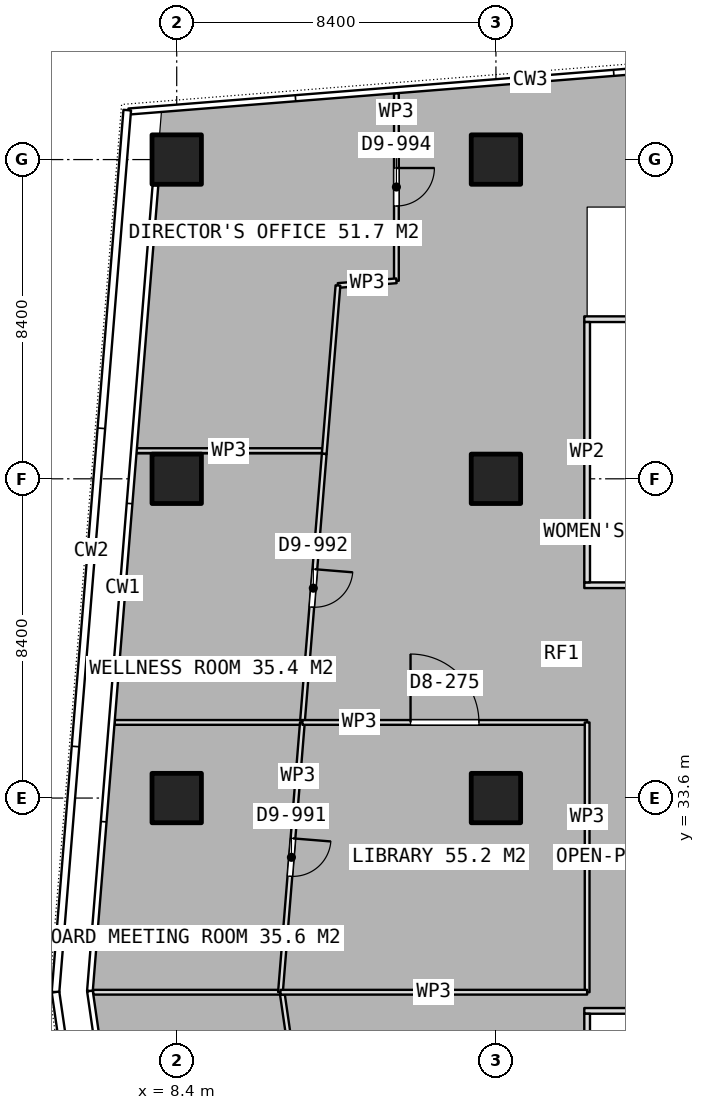
"""IFC4 building model, lengths in metres.
Left out: names, types, materials, properties, quantities, classifications, styles, units other than length and angle.
Written with IfcOpenShell. Run it as: python <this file> out.ifc"""

import sys

from ifc_helpers import new_model, si_unit, direction, frame, frame_2d, origin, origin_2d, place, context, subcontext, project, spatial, rectangle, extrude, element, fill, save


model = new_model("IFC4")
c1 = context("Model", 3, precision=1e-05, world=origin(), true_north=direction((0.0, 1.0)))
c2 = subcontext(c1, "Body", "Model", "MODEL_VIEW")
j1 = project(units=[si_unit("LENGTHUNIT", "METRE"), si_unit("PLANEANGLEUNIT", "RADIAN")], contexts=[c1])
p1 = place(None, origin())
s1 = spatial("IfcSite", under=j1, at=p1, CompositionType="ELEMENT")
p2 = place(p1, origin())
s2 = spatial("IfcBuilding", under=s1, at=p2, CompositionType="ELEMENT")
p3 = place(p2, frame((0.0, 0.0, 265.1)))
s3 = spatial("IfcBuildingStorey", under=s2, at=p3, CompositionType="ELEMENT", Elevation=265.1)
for number, where, z_axis, x_axis in (
    (1, (8.4, 33.6, 0.0), (0.0, 0.0, 1.0), (1.0, 0.0, 0.0)),
    (2, (8.4, 42.0, 0.0), (0.0, 0.0, 1.0), (1.0, 0.0, 0.0)),
    (3, (8.4, 50.4, 0.0), (0.0, 0.0, 1.0), (1.0, 0.0, 0.0)),
    (4, (16.8, 33.6, 0.0), (0.0, 0.0, 1.0), (1.0, 0.0, 0.0)),
    (5, (16.8, 42.0, 0.0), (0.0, 0.0, 1.0), (1.0, 0.0, 0.0)),
    (6, (16.8, 50.4, 0.0), (0.0, 0.0, 1.0), (1.0, 0.0, 0.0)),
):
    element("IfcColumn", number, at=place(p3, frame(where, z_axis=z_axis, x_axis=x_axis)), inside=s3, PredefinedType="COLUMN", context=c2, shape_type="SweptSolid", body=[
        extrude(rectangle(XDim=1.3, YDim=1.3, at=origin_2d()), origin(), (0.0, 0.0, 1.0), 3.75),
    ])
for number, where, z_axis, x_axis in (
    (7, (19.125, 39.2, 0.0), (0.0, 0.0, 1.0), (1.0, 0.0, 0.0)),
    (8, (19.125, 46.2, 0.0), (0.0, 0.0, 1.0), (1.0, 0.0, 0.0)),
):
    element("IfcWall", number, at=place(p3, frame(where, z_axis=z_axis, x_axis=x_axis)), inside=s3, PredefinedType="PARTITIONING", context=c2, shape_type="SweptSolid", body=[
        extrude(rectangle(XDim=3.35, YDim=0.15, at=frame_2d((1.675, 0.0))), origin(), (0.0, 0.0, 1.0), 3.5),
    ])
p4 = place(p3, frame((19.2, 39.275, 0.0), z_axis=(0.0, 0.0, 1.0), x_axis=(0.0, 1.0, 0.0)))
e9 = element("IfcWall", 9, at=p4, inside=s3, PredefinedType="PARTITIONING", context=c2, shape_type="SweptSolid", body=[
    extrude(rectangle(XDim=6.85, YDim=0.15, at=frame_2d((3.425, 0.0))), origin(), (0.0, 0.0, 1.0), 3.5),
])
p5 = place(p3, frame((19.125, 28.0, 0.0), z_axis=(0.0, 0.0, 1.0), x_axis=(1.0, 0.0, 0.0)))
e10 = element("IfcWall", 10, at=p5, inside=s3, PredefinedType="PARTITIONING", context=c2, shape_type="SweptSolid", body=[
    extrude(rectangle(XDim=3.35, YDim=0.15, at=frame_2d((1.675, 0.0))), origin(), (0.0, 0.0, 1.0), 3.5),
])
p6 = place(p3, frame((19.2, 21.075, 0.0), z_axis=(0.0, 0.0, 1.0), x_axis=(0.0, 1.0, 0.0)))
e11 = element("IfcWall", 11, at=p6, inside=s3, PredefinedType="PARTITIONING", context=c2, shape_type="SweptSolid", body=[
    extrude(rectangle(XDim=6.85, YDim=0.15, at=frame_2d((3.425, 0.0))), origin(), (0.0, 0.0, 1.0), 3.5),
])
p7 = place(p3, frame((12.226, 42.742, 0.0), z_axis=(0.0, 0.0, 1.0), x_axis=(-1.0, 0.0, 0.0)))
e12 = element("IfcWall", 12, at=p7, inside=s3, PredefinedType="PARTITIONING", context=c2, shape_type="SweptSolid", body=[
    extrude(rectangle(XDim=4.903, YDim=0.125, at=frame_2d((2.452, 0.0))), origin(), (0.0, 0.0, 1.0), 3.5),
])
p8 = place(p3, frame((14.181, 52.146, 0.0), z_axis=(0.0, 0.0, 1.0), x_axis=(0.0, -1.0, 0.0)))
e13 = element("IfcWall", 13, at=p8, inside=s3, PredefinedType="PARTITIONING", context=c2, shape_type="SweptSolid", body=[
    extrude(rectangle(XDim=4.936, YDim=0.125, at=frame_2d((2.468, 0.0))), origin(), (0.0, 0.0, 1.0), 3.5),
])
p9 = place(p8, frame((1.968, 0.0, 0.0)))
e14 = element("IfcOpeningElement", 14, at=p9, cuts=e13, PredefinedType="OPENING", context=c2, shape_type="SweptSolid", body=[
    extrude(rectangle(XDim=1.0, YDim=2.1, at=frame_2d((0.5, 1.05))), frame((0.0, 0.073, 0.0), z_axis=(0.0, -1.0, 0.0), x_axis=(1.0, 0.0, 0.0)), (0.0, 0.0, 1.0), 0.145),
])
p10 = place(p3, frame((14.181, 47.21, 0.0), z_axis=(0.0, 0.0, 1.0), x_axis=(-0.9968142721, -0.079757801737, 0.0)))
e15 = element("IfcWall", 15, at=p10, inside=s3, PredefinedType="PARTITIONING", context=c2, shape_type="SweptSolid", body=[
    extrude(rectangle(XDim=1.543, YDim=0.125, at=frame_2d((0.771, 0.0))), origin(), (0.0, 0.0, 1.0), 3.5),
])
p11 = place(p3, frame((12.643, 47.087, 0.0), z_axis=(0.0, 0.0, 1.0), x_axis=(-0.081240627764, -0.996694517092, 0.0)))
e16 = element("IfcWall", 16, at=p11, inside=s3, PredefinedType="PARTITIONING", context=c2, shape_type="SweptSolid", body=[
    extrude(rectangle(XDim=4.445, YDim=0.125, at=frame_2d((2.222, 0.0))), origin(), (0.0, 0.0, 1.0), 3.5),
])
p12 = place(p3, frame((12.282, 42.656, 0.0), z_axis=(0.0, 0.0, 1.0), x_axis=(-0.08110159124, -0.996705840205, 0.0)))
e17 = element("IfcWall", 17, at=p12, inside=s3, PredefinedType="PARTITIONING", context=c2, shape_type="SweptSolid", body=[
    extrude(rectangle(XDim=7.089, YDim=0.125, at=frame_2d((3.545, 0.0))), origin(), (0.0, 0.0, 1.0), 3.5),
])
p13 = place(p12, frame((3.045, 0.0, 0.0)))
e18 = element("IfcOpeningElement", 18, at=p13, cuts=e17, PredefinedType="OPENING", context=c2, shape_type="SweptSolid", body=[
    extrude(rectangle(XDim=1.0, YDim=2.1, at=frame_2d((0.5, 1.05))), frame((0.0, 0.073, 0.0), z_axis=(0.0, -1.0, 0.0), x_axis=(1.0, 0.0, 0.0)), (0.0, 0.0, 1.0), 0.145),
])
p14 = place(p3, frame((11.707, 35.59, 0.0), z_axis=(0.0, 0.0, 1.0), x_axis=(-1.0, 0.0, 0.0)))
e19 = element("IfcWall", 19, at=p14, inside=s3, PredefinedType="PARTITIONING", context=c2, shape_type="SweptSolid", body=[
    extrude(rectangle(XDim=4.936, YDim=0.125, at=frame_2d((2.468, 0.0))), origin(), (0.0, 0.0, 1.0), 3.5),
])
p15 = place(p3, frame((6.201, 28.491, 0.0), z_axis=(0.0, 0.0, 1.0), x_axis=(1.0, 0.0, 0.0)))
e20 = element("IfcWall", 20, at=p15, inside=s3, PredefinedType="PARTITIONING", context=c2, shape_type="SweptSolid", body=[
    extrude(rectangle(XDim=4.929, YDim=0.125, at=frame_2d((2.464, 0.0))), origin(), (0.0, 0.0, 1.0), 3.5),
])
p16 = place(p3, frame((11.182, 28.428, 0.0), z_axis=(0.0, 0.0, 1.0), x_axis=(0.143047767318, -0.9897157856, 0.0)))
e21 = element("IfcWall", 21, at=p16, inside=s3, PredefinedType="PARTITIONING", context=c2, shape_type="SweptSolid", body=[
    extrude(rectangle(XDim=7.544, YDim=0.125, at=frame_2d((3.772, 0.0))), origin(), (0.0, 0.0, 1.0), 3.5),
])
p17 = place(p16, frame((3.241, 0.0, 0.0)))
e22 = element("IfcOpeningElement", 22, at=p17, cuts=e21, PredefinedType="OPENING", context=c2, shape_type="SweptSolid", body=[
    extrude(rectangle(XDim=1.0, YDim=2.1, at=frame_2d((0.5, 1.05))), frame((0.0, 0.073, 0.0), z_axis=(0.0, -1.0, 0.0), x_axis=(1.0, 0.0, 0.0)), (0.0, 0.0, 1.0), 0.145),
])
p18 = place(p3, frame((11.707, 35.59, 0.0), z_axis=(0.0, 0.0, 1.0), x_axis=(-0.081031230988, -0.996711562893, 0.0)))
e23 = element("IfcWall", 23, at=p18, inside=s3, PredefinedType="PARTITIONING", context=c2, shape_type="SweptSolid", body=[
    extrude(rectangle(XDim=7.123, YDim=0.125, at=frame_2d((3.561, 0.0))), origin(), (0.0, 0.0, 1.0), 3.5),
])
p19 = place(p18, frame((3.061, 0.0, 0.0)))
e24 = element("IfcOpeningElement", 24, at=p19, cuts=e23, PredefinedType="OPENING", context=c2, shape_type="SweptSolid", body=[
    extrude(rectangle(XDim=1.0, YDim=2.1, at=frame_2d((0.5, 1.05))), frame((0.0, 0.073, 0.0), z_axis=(0.0, -1.0, 0.0), x_axis=(1.0, 0.0, 0.0)), (0.0, 0.0, 1.0), 0.145),
])
p20 = place(p3, frame((11.707, 35.59, 0.0), z_axis=(0.0, 0.0, 1.0), x_axis=(1.0, 0.0, 0.0)))
e25 = element("IfcWall", 25, at=p20, inside=s3, PredefinedType="PARTITIONING", context=c2, shape_type="SweptSolid", body=[
    extrude(rectangle(XDim=7.493, YDim=0.125, at=frame_2d((3.747, 0.0))), origin(), (0.0, 0.0, 1.0), 3.5),
])
p21 = place(p20, frame((2.846, 0.0, 0.0)))
e26 = element("IfcOpeningElement", 26, at=p21, cuts=e25, PredefinedType="OPENING", context=c2, shape_type="SweptSolid", body=[
    extrude(rectangle(XDim=1.8, YDim=2.1, at=frame_2d((0.9, 1.05))), frame((0.0, 0.073, 0.0), z_axis=(0.0, -1.0, 0.0), x_axis=(1.0, 0.0, 0.0)), (0.0, 0.0, 1.0), 0.145),
])
p22 = place(p3, frame((19.2, 35.59, 0.0), z_axis=(0.0, 0.0, 1.0), x_axis=(0.0, -1.0, 0.0)))
e27 = element("IfcWall", 27, at=p22, inside=s3, PredefinedType="PARTITIONING", context=c2, shape_type="SweptSolid", body=[
    extrude(rectangle(XDim=7.099, YDim=0.125, at=frame_2d((3.55, 0.0))), origin(), (0.0, 0.0, 1.0), 3.5),
])
p23 = place(p3, frame((19.2, 28.491, 0.0), z_axis=(0.0, 0.0, 1.0), x_axis=(-1.0, 0.0, 0.0)))
e28 = element("IfcWall", 28, at=p23, inside=s3, PredefinedType="PARTITIONING", context=c2, shape_type="SweptSolid", body=[
    extrude(rectangle(XDim=8.07, YDim=0.125, at=frame_2d((4.035, 0.0))), origin(), (0.0, 0.0, 1.0), 3.5),
])
p24 = place(p9, origin())
e29 = element("IfcDoor", 29, at=p24, inside=s3, OperationType="SINGLE_SWING_LEFT", PredefinedType="DOOR", context=c2, shape_type="SweptSolid", body=[
    extrude(rectangle(XDim=1.0, YDim=2.1, at=frame_2d((0.5, 1.05))), frame((0.0, 0.025, 0.0), z_axis=(0.0, -1.0, 0.0), x_axis=(1.0, 0.0, 0.0)), (0.0, 0.0, 1.0), 0.05),
])
fill(e14, e29)
p25 = place(p13, origin())
e30 = element("IfcDoor", 30, at=p25, inside=s3, OperationType="SINGLE_SWING_LEFT", PredefinedType="DOOR", context=c2, shape_type="SweptSolid", body=[
    extrude(rectangle(XDim=1.0, YDim=2.1, at=frame_2d((0.5, 1.05))), frame((0.0, 0.025, 0.0), z_axis=(0.0, -1.0, 0.0), x_axis=(1.0, 0.0, 0.0)), (0.0, 0.0, 1.0), 0.05),
])
fill(e18, e30)
p26 = place(p21, origin())
e31 = element("IfcDoor", 31, at=p26, inside=s3, OperationType="DOUBLE_DOOR_SINGLE_SWING", PredefinedType="DOOR", context=c2, shape_type="SweptSolid", body=[
    extrude(rectangle(XDim=1.8, YDim=2.1, at=frame_2d((0.9, 1.05))), frame((0.0, 0.025, 0.0), z_axis=(0.0, -1.0, 0.0), x_axis=(1.0, 0.0, 0.0)), (0.0, 0.0, 1.0), 0.05),
])
fill(e26, e31)
p27 = place(p19, origin())
e32 = element("IfcDoor", 32, at=p27, inside=s3, OperationType="SINGLE_SWING_LEFT", PredefinedType="DOOR", context=c2, shape_type="SweptSolid", body=[
    extrude(rectangle(XDim=1.0, YDim=2.1, at=frame_2d((0.5, 1.05))), frame((0.0, 0.025, 0.0), z_axis=(0.0, -1.0, 0.0), x_axis=(1.0, 0.0, 0.0)), (0.0, 0.0, 1.0), 0.05),
])
fill(e24, e32)
save(model, sys.argv[1])
